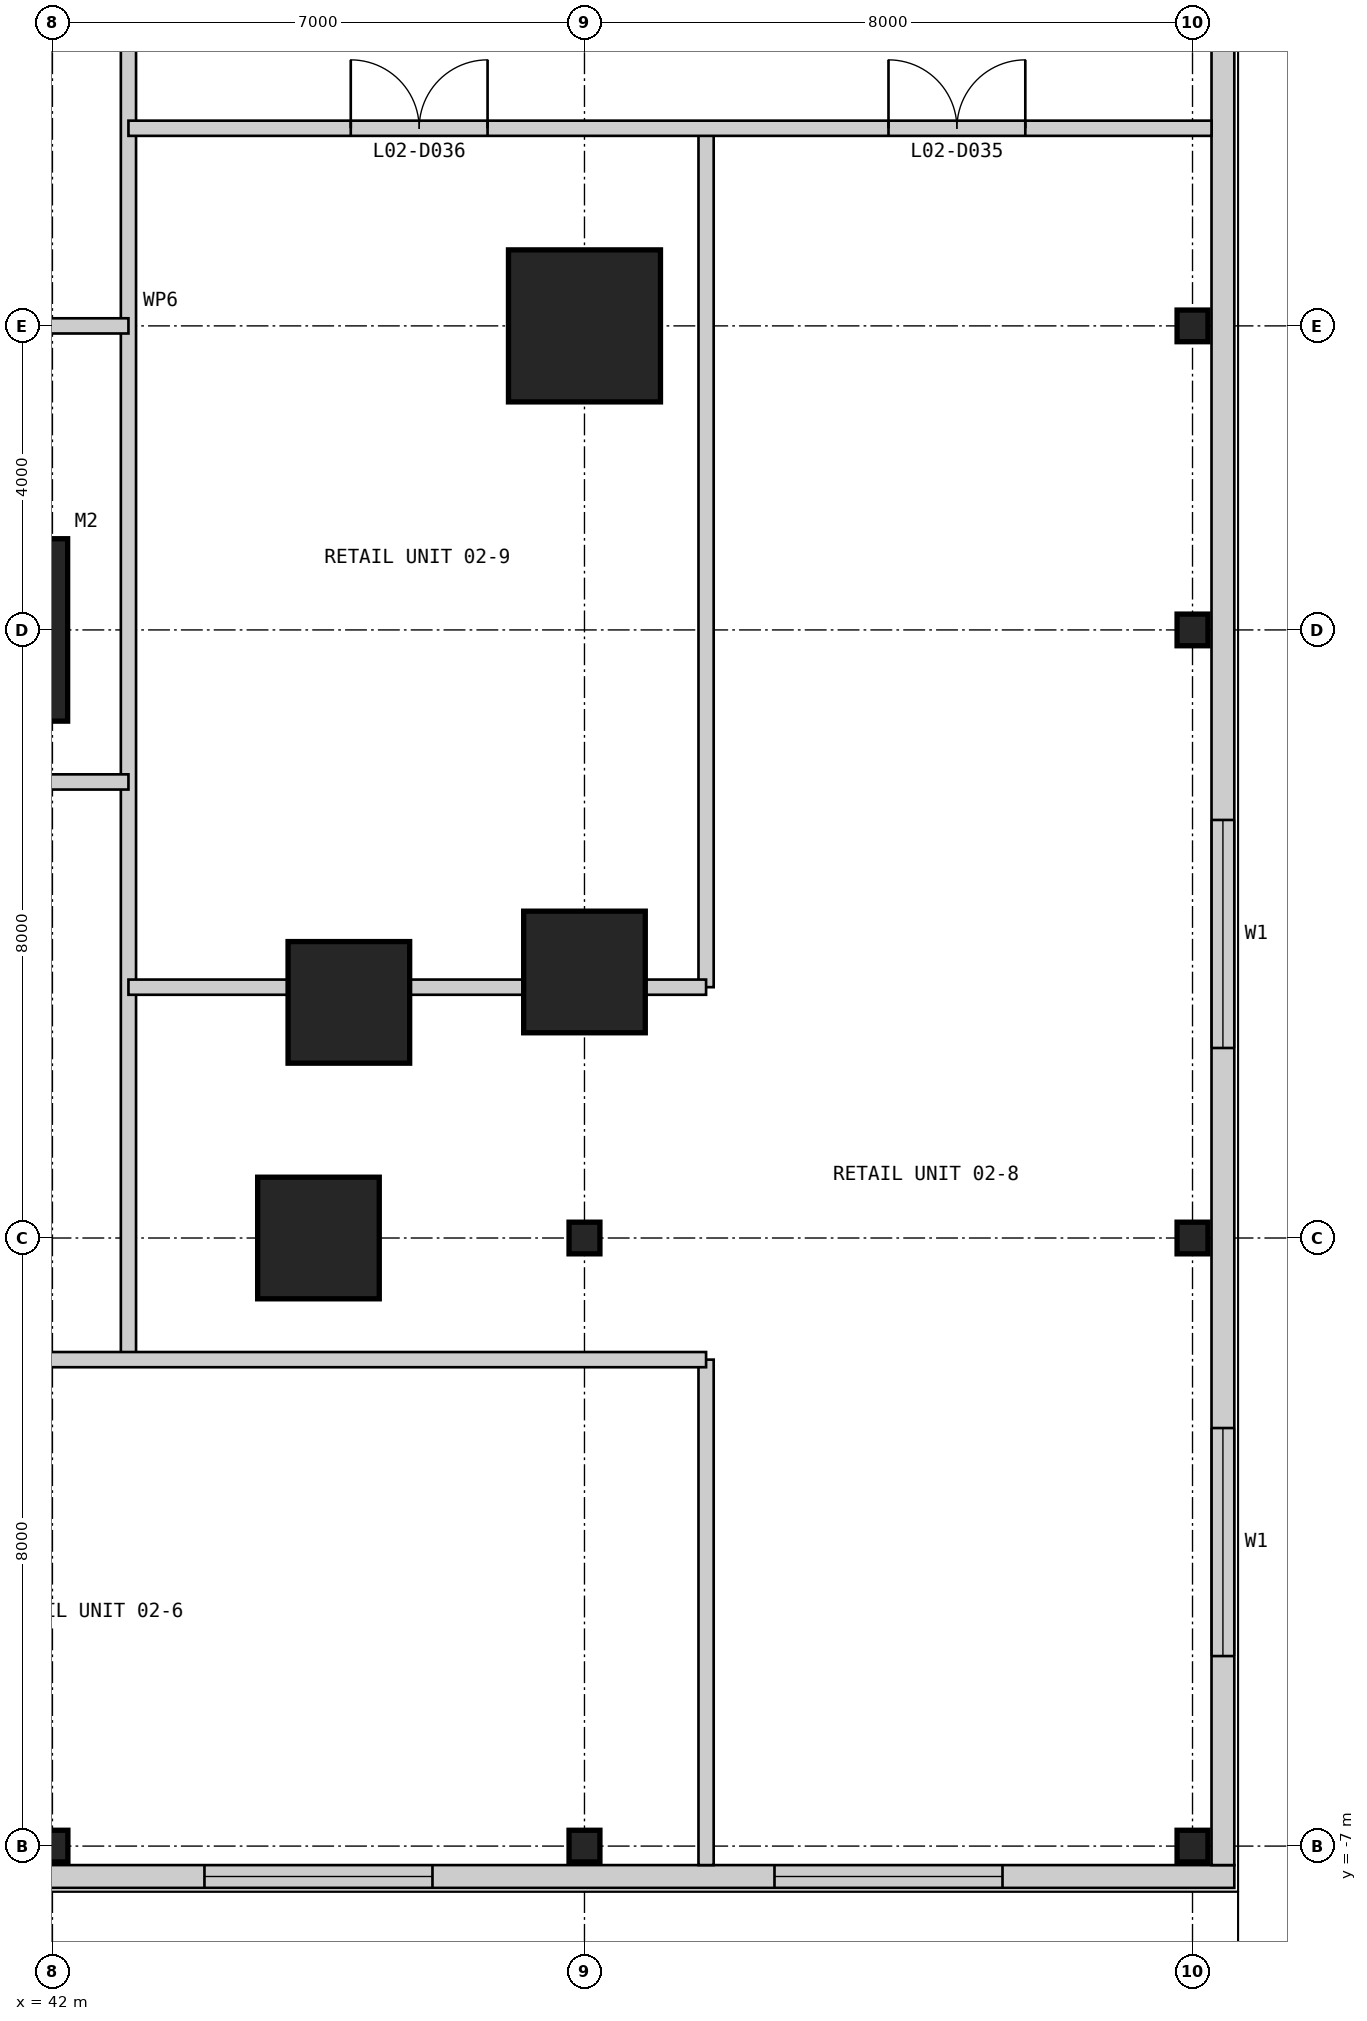
"""IFC4 building model, lengths in metres.
Left out: names, types, materials, properties, quantities, classifications, styles, units other than length and angle.
Written with IfcOpenShell. Run it as: python <this file> out.ifc"""

import sys

from ifc_helpers import new_model, si_unit, direction, frame, frame_2d, origin, origin_2d, place, context, subcontext, project, spatial, rectangle, i_section, extrude, element, fill, save


model = new_model("IFC4")
c1 = context("Model", 3, precision=1e-05, world=origin(), true_north=direction((0.0, 1.0)))
c2 = subcontext(c1, "Body", "Model", "MODEL_VIEW")
j1 = project(units=[si_unit("LENGTHUNIT", "METRE"), si_unit("PLANEANGLEUNIT", "RADIAN")], contexts=[c1])
p1 = place(None, origin())
s1 = spatial("IfcSite", under=j1, at=p1, CompositionType="ELEMENT")
p2 = place(p1, origin())
s2 = spatial("IfcBuilding", under=s1, at=p2, CompositionType="ELEMENT")
p3 = place(p2, frame((0.0, 0.0, 11.8)))
s3 = spatial("IfcBuildingStorey", under=s2, at=p3, CompositionType="ELEMENT", Elevation=11.8)
p4 = place(p3, frame((41.0, 9.0, 0.0), z_axis=(0.0, 0.0, 1.0), x_axis=(1.0, 0.0, 0.0)))
e1 = element("IfcColumn", 1, at=p4, inside=s3, PredefinedType="COLUMN", context=c2, shape_type="SweptSolid", body=[
    extrude(rectangle(XDim=2.4, YDim=2.4, at=origin_2d()), origin(), (0.0, 0.0, 1.0), 4.8),
])
for number, where, z_axis, x_axis in (
    (2, (45.5, 1.0, 0.0), (0.0, 0.0, 1.0), (1.0, 0.0, 0.0)),
    (3, (45.9, 4.1, 0.0), (0.0, 0.0, 1.0), (1.0, 0.0, 0.0)),
    (4, (49.0, 4.5, 0.0), (0.0, 0.0, 1.0), (1.0, 0.0, 0.0)),
):
    element("IfcColumn", number, at=place(p3, frame(where, z_axis=z_axis, x_axis=x_axis)), inside=s3, PredefinedType="COLUMN", context=c2, shape_type="SweptSolid", body=[
        extrude(rectangle(XDim=1.6, YDim=1.6, at=origin_2d()), origin(), (0.0, 0.0, 1.0), 4.8),
    ])
p5 = place(p3, frame((49.0, 13.0, 0.0), z_axis=(0.0, 0.0, 1.0), x_axis=(1.0, 0.0, 0.0)))
e5 = element("IfcColumn", 5, at=p5, inside=s3, PredefinedType="COLUMN", context=c2, shape_type="SweptSolid", body=[
    extrude(rectangle(XDim=2.0, YDim=2.0, at=origin_2d()), origin(), (0.0, 0.0, 1.0), 4.8),
])
for number, where, z_axis, x_axis in (
    (6, (42.0, -7.0, 0.0), (0.0, 0.0, 1.0), (1.0, 0.0, 0.0)),
    (7, (49.0, -7.0, 0.0), (0.0, 0.0, 1.0), (1.0, 0.0, 0.0)),
    (8, (49.0, 1.0, 0.0), (0.0, 0.0, 1.0), (1.0, 0.0, 0.0)),
    (9, (57.0, -7.0, 0.0), (0.0, 0.0, 1.0), (1.0, 0.0, 0.0)),
    (10, (57.0, 1.0, 0.0), (0.0, 0.0, 1.0), (1.0, 0.0, 0.0)),
    (11, (57.0, 9.0, 0.0), (0.0, 0.0, 1.0), (1.0, 0.0, 0.0)),
    (12, (57.0, 13.0, 0.0), (0.0, 0.0, 1.0), (1.0, 0.0, 0.0)),
):
    element("IfcColumn", number, at=place(p3, frame(where, z_axis=z_axis, x_axis=x_axis)), inside=s3, PredefinedType="COLUMN", context=c2, shape_type="SweptSolid", body=[
        extrude(i_section(OverallWidth=0.406, OverallDepth=0.417, WebThickness=0.03, FlangeThickness=0.048, at=origin_2d()), origin(), (0.0, 0.0, 1.0), 4.8),
    ])
p6 = place(p3, frame((-15.55, -7.4, 0.0), z_axis=(0.0, 0.0, 1.0), x_axis=(1.0, 0.0, 0.0)))
e13 = element("IfcWall", 13, at=p6, inside=s3, PredefinedType="SOLIDWALL", context=c2, shape_type="SweptSolid", body=[
    extrude(rectangle(XDim=73.1, YDim=0.3, at=frame_2d((36.55, 0.0))), origin(), (0.0, 0.0, 1.0), 4.5),
])
p7 = place(p6, frame((11.65, 0.0, 0.0)))
e14 = element("IfcOpeningElement", 14, at=p7, cuts=e13, PredefinedType="OPENING", context=c2, shape_type="SweptSolid", body=[
    extrude(rectangle(XDim=1.8, YDim=2.4, at=frame_2d((0.9, 1.2))), frame((0.0, 0.16, 0.0), z_axis=(0.0, -1.0, 0.0), x_axis=(1.0, 0.0, 0.0)), (0.0, 0.0, 1.0), 0.32),
])
p8 = place(p6, frame((45.65, 0.0, 0.0)))
e15 = element("IfcOpeningElement", 15, at=p8, cuts=e13, PredefinedType="OPENING", context=c2, shape_type="SweptSolid", body=[
    extrude(rectangle(XDim=1.8, YDim=2.4, at=frame_2d((0.9, 1.2))), frame((0.0, 0.16, 0.0), z_axis=(0.0, -1.0, 0.0), x_axis=(1.0, 0.0, 0.0)), (0.0, 0.0, 1.0), 0.32),
])
p9 = place(p6, frame((3.05, 0.0, 0.9)))
e16 = element("IfcOpeningElement", 16, at=p9, cuts=e13, PredefinedType="OPENING", context=c2, shape_type="SweptSolid", body=[
    extrude(rectangle(XDim=3.0, YDim=2.4, at=frame_2d((1.5, 1.2))), frame((0.0, 0.16, 0.0), z_axis=(0.0, -1.0, 0.0), x_axis=(1.0, 0.0, 0.0)), (0.0, 0.0, 1.0), 0.32),
])
p10 = place(p6, frame((19.05, 0.0, 0.9)))
e17 = element("IfcOpeningElement", 17, at=p10, cuts=e13, PredefinedType="OPENING", context=c2, shape_type="SweptSolid", body=[
    extrude(rectangle(XDim=3.0, YDim=2.4, at=frame_2d((1.5, 1.2))), frame((0.0, 0.16, 0.0), z_axis=(0.0, -1.0, 0.0), x_axis=(1.0, 0.0, 0.0)), (0.0, 0.0, 1.0), 0.32),
])
p11 = place(p6, frame((33.05, 0.0, 0.9)))
e18 = element("IfcOpeningElement", 18, at=p11, cuts=e13, PredefinedType="OPENING", context=c2, shape_type="SweptSolid", body=[
    extrude(rectangle(XDim=3.0, YDim=2.4, at=frame_2d((1.5, 1.2))), frame((0.0, 0.16, 0.0), z_axis=(0.0, -1.0, 0.0), x_axis=(1.0, 0.0, 0.0)), (0.0, 0.0, 1.0), 0.32),
])
p12 = place(p6, frame((53.55, 0.0, 0.9)))
e19 = element("IfcOpeningElement", 19, at=p12, cuts=e13, PredefinedType="OPENING", context=c2, shape_type="SweptSolid", body=[
    extrude(rectangle(XDim=3.0, YDim=2.4, at=frame_2d((1.5, 1.2))), frame((0.0, 0.16, 0.0), z_axis=(0.0, -1.0, 0.0), x_axis=(1.0, 0.0, 0.0)), (0.0, 0.0, 1.0), 0.32),
])
p13 = place(p6, frame((59.55, 0.0, 0.9)))
e20 = element("IfcOpeningElement", 20, at=p13, cuts=e13, PredefinedType="OPENING", context=c2, shape_type="SweptSolid", body=[
    extrude(rectangle(XDim=3.0, YDim=2.4, at=frame_2d((1.5, 1.2))), frame((0.0, 0.16, 0.0), z_axis=(0.0, -1.0, 0.0), x_axis=(1.0, 0.0, 0.0)), (0.0, 0.0, 1.0), 0.32),
])
p14 = place(p6, frame((67.05, 0.0, 0.9)))
e21 = element("IfcOpeningElement", 21, at=p14, cuts=e13, PredefinedType="OPENING", context=c2, shape_type="SweptSolid", body=[
    extrude(rectangle(XDim=3.0, YDim=2.4, at=frame_2d((1.5, 1.2))), frame((0.0, 0.16, 0.0), z_axis=(0.0, -1.0, 0.0), x_axis=(1.0, 0.0, 0.0)), (0.0, 0.0, 1.0), 0.32),
])
p15 = place(p3, frame((57.4, -7.25, 0.0), z_axis=(0.0, 0.0, 1.0), x_axis=(0.0, 1.0, 0.0)))
e22 = element("IfcWall", 22, at=p15, inside=s3, PredefinedType="SOLIDWALL", context=c2, shape_type="SweptSolid", body=[
    extrude(rectangle(XDim=72.5, YDim=0.3, at=frame_2d((36.25, 0.0))), origin(), (0.0, 0.0, 1.0), 4.5),
])
p16 = place(p15, frame((25.35, 0.0, 0.0)))
e23 = element("IfcOpeningElement", 23, at=p16, cuts=e22, PredefinedType="OPENING", context=c2, shape_type="SweptSolid", body=[
    extrude(rectangle(XDim=1.8, YDim=2.4, at=frame_2d((0.9, 1.2))), frame((0.0, 0.16, 0.0), z_axis=(0.0, -1.0, 0.0), x_axis=(1.0, 0.0, 0.0)), (0.0, 0.0, 1.0), 0.32),
])
p17 = place(p15, frame((45.85, 0.0, 0.0)))
e24 = element("IfcOpeningElement", 24, at=p17, cuts=e22, PredefinedType="OPENING", context=c2, shape_type="SweptSolid", body=[
    extrude(rectangle(XDim=1.8, YDim=2.4, at=frame_2d((0.9, 1.2))), frame((0.0, 0.16, 0.0), z_axis=(0.0, -1.0, 0.0), x_axis=(1.0, 0.0, 0.0)), (0.0, 0.0, 1.0), 0.32),
])
p18 = place(p15, frame((59.35, 0.0, 0.0)))
e25 = element("IfcOpeningElement", 25, at=p18, cuts=e22, PredefinedType="OPENING", context=c2, shape_type="SweptSolid", body=[
    extrude(rectangle(XDim=1.8, YDim=2.4, at=frame_2d((0.9, 1.2))), frame((0.0, 0.16, 0.0), z_axis=(0.0, -1.0, 0.0), x_axis=(1.0, 0.0, 0.0)), (0.0, 0.0, 1.0), 0.32),
])
p19 = place(p15, frame((2.75, 0.0, 0.9)))
e26 = element("IfcOpeningElement", 26, at=p19, cuts=e22, PredefinedType="OPENING", context=c2, shape_type="SweptSolid", body=[
    extrude(rectangle(XDim=3.0, YDim=2.4, at=frame_2d((1.5, 1.2))), frame((0.0, 0.16, 0.0), z_axis=(0.0, -1.0, 0.0), x_axis=(1.0, 0.0, 0.0)), (0.0, 0.0, 1.0), 0.32),
])
p20 = place(p15, frame((10.75, 0.0, 0.9)))
e27 = element("IfcOpeningElement", 27, at=p20, cuts=e22, PredefinedType="OPENING", context=c2, shape_type="SweptSolid", body=[
    extrude(rectangle(XDim=3.0, YDim=2.4, at=frame_2d((1.5, 1.2))), frame((0.0, 0.16, 0.0), z_axis=(0.0, -1.0, 0.0), x_axis=(1.0, 0.0, 0.0)), (0.0, 0.0, 1.0), 0.32),
])
p21 = place(p15, frame((36.75, 0.0, 0.9)))
e28 = element("IfcOpeningElement", 28, at=p21, cuts=e22, PredefinedType="OPENING", context=c2, shape_type="SweptSolid", body=[
    extrude(rectangle(XDim=3.0, YDim=2.4, at=frame_2d((1.5, 1.2))), frame((0.0, 0.16, 0.0), z_axis=(0.0, -1.0, 0.0), x_axis=(1.0, 0.0, 0.0)), (0.0, 0.0, 1.0), 0.32),
])
p22 = place(p15, frame((51.25, 0.0, 0.9)))
e29 = element("IfcOpeningElement", 29, at=p22, cuts=e22, PredefinedType="OPENING", context=c2, shape_type="SweptSolid", body=[
    extrude(rectangle(XDim=3.0, YDim=2.4, at=frame_2d((1.5, 1.2))), frame((0.0, 0.16, 0.0), z_axis=(0.0, -1.0, 0.0), x_axis=(1.0, 0.0, 0.0)), (0.0, 0.0, 1.0), 0.32),
])
p23 = place(p15, frame((66.75, 0.0, 0.9)))
e30 = element("IfcOpeningElement", 30, at=p23, cuts=e22, PredefinedType="OPENING", context=c2, shape_type="SweptSolid", body=[
    extrude(rectangle(XDim=3.0, YDim=2.4, at=frame_2d((1.5, 1.2))), frame((0.0, 0.16, 0.0), z_axis=(0.0, -1.0, 0.0), x_axis=(1.0, 0.0, 0.0)), (0.0, 0.0, 1.0), 0.32),
])
p24 = place(p3, frame((43.0, -0.6, 0.0), z_axis=(0.0, 0.0, 1.0), x_axis=(0.0, 1.0, 0.0)))
e31 = element("IfcWall", 31, at=p24, inside=s3, PredefinedType="PARTITIONING", context=c2, shape_type="SweptSolid", body=[
    extrude(rectangle(XDim=28.6, YDim=0.2, at=frame_2d((14.3, 0.0))), origin(), (0.0, 0.0, 1.0), 3.843),
])
p25 = place(p3, frame((50.6, -7.25, 0.0), z_axis=(0.0, 0.0, 1.0), x_axis=(0.0, 1.0, 0.0)))
e32 = element("IfcWall", 32, at=p25, inside=s3, PredefinedType="PARTITIONING", context=c2, shape_type="SweptSolid", body=[
    extrude(rectangle(XDim=6.65, YDim=0.2, at=frame_2d((3.325, 0.0))), origin(), (0.0, 0.0, 1.0), 4.5),
])
p26 = place(p3, frame((50.6, 4.3, 0.0), z_axis=(0.0, 0.0, 1.0), x_axis=(0.0, 1.0, 0.0)))
e33 = element("IfcWall", 33, at=p26, inside=s3, PredefinedType="PARTITIONING", context=c2, shape_type="SweptSolid", body=[
    extrude(rectangle(XDim=11.3, YDim=0.2, at=frame_2d((5.65, 0.0))), origin(), (0.0, 0.0, 1.0), 4.5),
])
p27 = place(p3, frame((34.4, -0.6, 0.0), z_axis=(0.0, 0.0, 1.0), x_axis=(1.0, 0.0, 0.0)))
e34 = element("IfcWall", 34, at=p27, inside=s3, PredefinedType="PARTITIONING", context=c2, shape_type="SweptSolid", body=[
    extrude(rectangle(XDim=16.2, YDim=0.2, at=frame_2d((8.1, 0.0))), origin(), (0.0, 0.0, 1.0), 4.5),
])
p28 = place(p3, frame((43.0, 4.3, 0.0), z_axis=(0.0, 0.0, 1.0), x_axis=(1.0, 0.0, 0.0)))
e35 = element("IfcWall", 35, at=p28, inside=s3, PredefinedType="PARTITIONING", context=c2, shape_type="SweptSolid", body=[
    extrude(rectangle(XDim=2.1, YDim=0.2, at=frame_2d((1.05, 0.0))), origin(), (0.0, 0.0, 1.0), 4.5),
])
p29 = place(p3, frame((46.7, 4.3, 0.0), z_axis=(0.0, 0.0, 1.0), x_axis=(1.0, 0.0, 0.0)))
e36 = element("IfcWall", 36, at=p29, inside=s3, PredefinedType="PARTITIONING", context=c2, shape_type="SweptSolid", body=[
    extrude(rectangle(XDim=1.5, YDim=0.2, at=frame_2d((0.75, 0.0))), origin(), (0.0, 0.0, 1.0), 3.65),
])
p30 = place(p3, frame((49.8, 4.3, 0.0), z_axis=(0.0, 0.0, 1.0), x_axis=(1.0, 0.0, 0.0)))
e37 = element("IfcWall", 37, at=p30, inside=s3, PredefinedType="PARTITIONING", context=c2, shape_type="SweptSolid", body=[
    extrude(rectangle(XDim=0.8, YDim=0.2, at=frame_2d((0.4, 0.0))), origin(), (0.0, 0.0, 1.0), 4.5),
])
p31 = place(p3, frame((34.4, 7.0, 0.0), z_axis=(0.0, 0.0, 1.0), x_axis=(1.0, 0.0, 0.0)))
e38 = element("IfcWall", 38, at=p31, inside=s3, PredefinedType="PARTITIONING", context=c2, shape_type="SweptSolid", body=[
    extrude(rectangle(XDim=8.6, YDim=0.2, at=frame_2d((4.3, 0.0))), origin(), (0.0, 0.0, 1.0), 4.5),
])
p32 = place(p3, frame((37.0, 13.0, 0.0), z_axis=(0.0, 0.0, 1.0), x_axis=(1.0, 0.0, 0.0)))
e39 = element("IfcWall", 39, at=p32, inside=s3, PredefinedType="PARTITIONING", context=c2, shape_type="SweptSolid", body=[
    extrude(rectangle(XDim=6.0, YDim=0.2, at=frame_2d((3.0, 0.0))), origin(), (0.0, 0.0, 1.0), 3.653),
])
p33 = place(p3, frame((43.0, 15.6, 0.0), z_axis=(0.0, 0.0, 1.0), x_axis=(1.0, 0.0, 0.0)))
e40 = element("IfcWall", 40, at=p33, inside=s3, PredefinedType="PARTITIONING", context=c2, shape_type="SweptSolid", body=[
    extrude(rectangle(XDim=14.25, YDim=0.2, at=frame_2d((7.125, 0.0))), origin(), (0.0, 0.0, 1.0), 4.5),
])
p34 = place(p33, frame((10.0, 0.0, 0.0)))
e41 = element("IfcOpeningElement", 41, at=p34, cuts=e40, PredefinedType="OPENING", context=c2, shape_type="SweptSolid", body=[
    extrude(rectangle(XDim=1.8, YDim=2.4, at=frame_2d((0.9, 1.2))), frame((0.0, 0.11, 0.0), z_axis=(0.0, -1.0, 0.0), x_axis=(1.0, 0.0, 0.0)), (0.0, 0.0, 1.0), 0.22),
])
p35 = place(p33, frame((2.925, 0.0, 0.0)))
e42 = element("IfcOpeningElement", 42, at=p35, cuts=e40, PredefinedType="OPENING", context=c2, shape_type="SweptSolid", body=[
    extrude(rectangle(XDim=1.8, YDim=2.4, at=frame_2d((0.9, 1.2))), frame((0.0, 0.11, 0.0), z_axis=(0.0, -1.0, 0.0), x_axis=(1.0, 0.0, 0.0)), (0.0, 0.0, 1.0), 0.22),
])
p36 = place(p13, origin())
e43 = element("IfcWindow", 43, at=p36, inside=s3, PartitioningType="SINGLE_PANEL", PredefinedType="WINDOW", context=c2, shape_type="SweptSolid", body=[
    extrude(rectangle(XDim=3.0, YDim=2.4, at=frame_2d((1.5, 1.2))), frame((0.0, 0.03, 0.0), z_axis=(0.0, -1.0, 0.0), x_axis=(1.0, 0.0, 0.0)), (0.0, 0.0, 1.0), 0.06),
])
fill(e20, e43)
p37 = place(p14, origin())
e44 = element("IfcWindow", 44, at=p37, inside=s3, PartitioningType="SINGLE_PANEL", PredefinedType="WINDOW", context=c2, shape_type="SweptSolid", body=[
    extrude(rectangle(XDim=3.0, YDim=2.4, at=frame_2d((1.5, 1.2))), frame((0.0, 0.03, 0.0), z_axis=(0.0, -1.0, 0.0), x_axis=(1.0, 0.0, 0.0)), (0.0, 0.0, 1.0), 0.06),
])
fill(e21, e44)
p38 = place(p19, origin())
e45 = element("IfcWindow", 45, at=p38, inside=s3, PartitioningType="SINGLE_PANEL", PredefinedType="WINDOW", context=c2, shape_type="SweptSolid", body=[
    extrude(rectangle(XDim=3.0, YDim=2.4, at=frame_2d((1.5, 1.2))), frame((0.0, 0.03, 0.0), z_axis=(0.0, -1.0, 0.0), x_axis=(1.0, 0.0, 0.0)), (0.0, 0.0, 1.0), 0.06),
])
fill(e26, e45)
p39 = place(p20, origin())
e46 = element("IfcWindow", 46, at=p39, inside=s3, PartitioningType="SINGLE_PANEL", PredefinedType="WINDOW", context=c2, shape_type="SweptSolid", body=[
    extrude(rectangle(XDim=3.0, YDim=2.4, at=frame_2d((1.5, 1.2))), frame((0.0, 0.03, 0.0), z_axis=(0.0, -1.0, 0.0), x_axis=(1.0, 0.0, 0.0)), (0.0, 0.0, 1.0), 0.06),
])
fill(e27, e46)
p40 = place(p34, origin())
e47 = element("IfcDoor", 47, at=p40, inside=s3, OperationType="DOUBLE_DOOR_SINGLE_SWING", PredefinedType="DOOR", context=c2, shape_type="SweptSolid", body=[
    extrude(rectangle(XDim=1.8, YDim=2.4, at=frame_2d((0.9, 1.2))), frame((0.0, 0.025, 0.0), z_axis=(0.0, -1.0, 0.0), x_axis=(1.0, 0.0, 0.0)), (0.0, 0.0, 1.0), 0.05),
])
fill(e41, e47)
p41 = place(p35, origin())
e48 = element("IfcDoor", 48, at=p41, inside=s3, OperationType="DOUBLE_DOOR_SINGLE_SWING", PredefinedType="DOOR", context=c2, shape_type="SweptSolid", body=[
    extrude(rectangle(XDim=1.8, YDim=2.4, at=frame_2d((0.9, 1.2))), frame((0.0, 0.025, 0.0), z_axis=(0.0, -1.0, 0.0), x_axis=(1.0, 0.0, 0.0)), (0.0, 0.0, 1.0), 0.05),
])
fill(e42, e48)
save(model, sys.argv[1])
